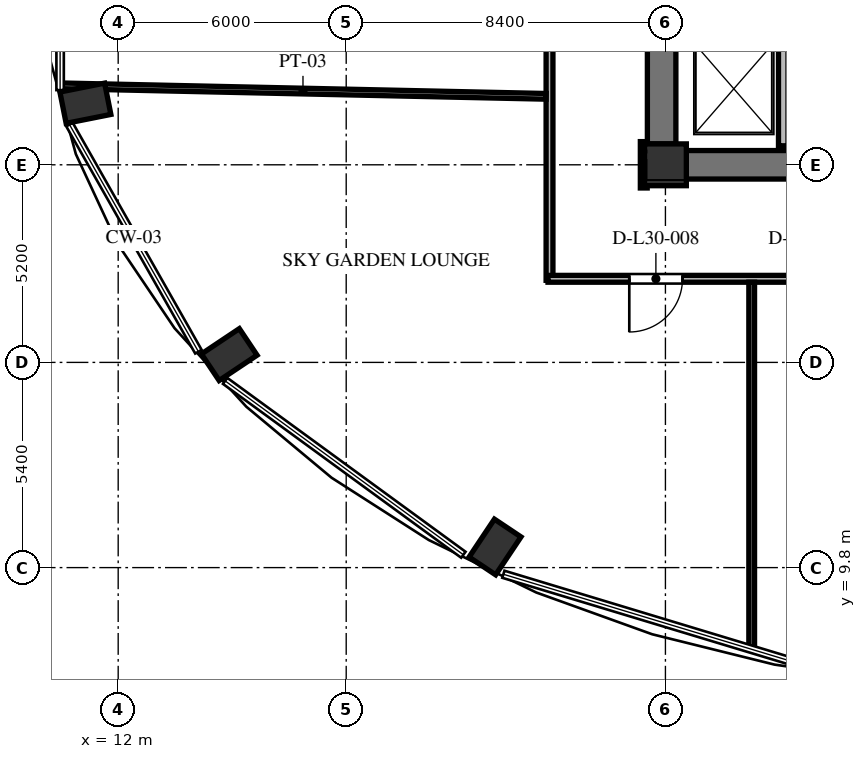
"""IFC4 building model, lengths in metres.
Left out: names, types, materials, properties, quantities, classifications, styles, units other than length and angle.
Written with IfcOpenShell. Run it as: python <this file> out.ifc"""

import sys

from ifc_helpers import new_model, si_unit, direction, frame, frame_2d, origin, origin_2d, place, context, subcontext, project, spatial, rectangle, extrude, element, fill, save


model = new_model("IFC4")
c1 = context("Model", 3, precision=1e-05, world=origin(), true_north=direction((0.0, 1.0)))
c2 = subcontext(c1, "Body", "Model", "MODEL_VIEW")
j1 = project(units=[si_unit("LENGTHUNIT", "METRE"), si_unit("PLANEANGLEUNIT", "RADIAN")], contexts=[c1])
p1 = place(None, origin())
s1 = spatial("IfcSite", under=j1, at=p1, CompositionType="ELEMENT")
p2 = place(p1, origin())
s2 = spatial("IfcBuilding", under=s1, at=p2, CompositionType="ELEMENT")
p3 = place(p2, frame((0.0, 0.0, 118.224)))
s3 = spatial("IfcBuildingStorey", under=s2, at=p3, CompositionType="ELEMENT", Elevation=118.224)
for number, where, z_axis, x_axis in (
    (1, (11.137, 22.02, 0.0), (0.0, 0.0, 1.0), (-0.981, -0.195, 0.0)),
    (2, (14.922, 15.405, 0.0), (0.0, 0.0, 1.0), (-0.831, -0.556, 0.0)),
    (3, (21.916, 10.343, 0.0), (0.0, 0.0, 1.0), (-0.556, -0.831, 0.0)),
):
    element("IfcColumn", number, at=place(p3, frame(where, z_axis=z_axis, x_axis=x_axis)), inside=s3, PredefinedType="COLUMN", context=c2, shape_type="SweptSolid", body=[
        extrude(rectangle(XDim=1.2, YDim=0.84, at=origin_2d()), origin(), (0.0, 0.0, 1.0), 3.648),
    ])
p4 = place(p3, frame((26.4, 20.4, 0.0), z_axis=(0.0, 0.0, 1.0), x_axis=(1.0, 0.0, 0.0)))
e4 = element("IfcColumn", 4, at=p4, inside=s3, PredefinedType="COLUMN", context=c2, shape_type="SweptSolid", body=[
    extrude(rectangle(XDim=1.1, YDim=1.1, at=origin_2d()), origin(), (0.0, 0.0, 1.0), 3.648),
])
p5 = place(p3, frame((26.3, 20.95, 0.0), z_axis=(0.0, 0.0, 1.0), x_axis=(0.0, 1.0, 0.0)))
e5 = element("IfcWall", 5, at=p5, inside=s3, PredefinedType="SHEAR", context=c2, shape_type="SweptSolid", body=[
    extrude(rectangle(XDim=14.1, YDim=0.75, at=frame_2d((7.05, 0.0))), origin(), (0.0, 0.0, 1.0), 3.648),
])
p6 = place(p5, frame((6.5, 0.0, 0.0)))
e6 = element("IfcOpeningElement", 6, at=p6, cuts=e5, PredefinedType="OPENING", context=c2, shape_type="SweptSolid", body=[
    extrude(rectangle(XDim=1.2, YDim=2.15, at=frame_2d((0.6, 1.075))), frame((0.0, 0.385, 0.0), z_axis=(0.0, -1.0, 0.0), x_axis=(1.0, 0.0, 0.0)), (0.0, 0.0, 1.0), 0.77),
])
p7 = place(p5, frame((9.6, 0.0, 0.0)))
e7 = element("IfcOpeningElement", 7, at=p7, cuts=e5, PredefinedType="OPENING", context=c2, shape_type="SweptSolid", body=[
    extrude(rectangle(XDim=1.3, YDim=2.2, at=frame_2d((0.65, 1.1))), frame((0.0, 0.385, 0.0), z_axis=(0.0, -1.0, 0.0), x_axis=(1.0, 0.0, 0.0)), (0.0, 0.0, 1.0), 0.77),
])
p8 = place(p5, frame((3.26, 0.0, 0.0)))
e8 = element("IfcOpeningElement", 8, at=p8, cuts=e5, PredefinedType="OPENING", context=c2, shape_type="SweptSolid", body=[
    extrude(rectangle(XDim=1.3, YDim=2.2, at=frame_2d((0.65, 1.1))), frame((0.0, 0.385, 0.0), z_axis=(0.0, -1.0, 0.0), x_axis=(1.0, 0.0, 0.0)), (0.0, 0.0, 1.0), 0.77),
])
p9 = place(p3, frame((26.95, 20.4, 0.0), z_axis=(0.0, 0.0, 1.0), x_axis=(1.0, 0.0, 0.0)))
e9 = element("IfcWall", 9, at=p9, inside=s3, PredefinedType="SHEAR", context=c2, shape_type="SweptSolid", body=[
    extrude(rectangle(XDim=5.375, YDim=0.75, at=frame_2d((2.688, 0.0))), origin(), (0.0, 0.0, 1.0), 3.648),
])
p10 = place(p3, frame((29.5, 20.9, 0.0), z_axis=(0.0, 0.0, 1.0), x_axis=(0.0, 1.0, 0.0)))
e10 = element("IfcWall", 10, at=p10, inside=s3, PredefinedType="SOLIDWALL", context=c2, shape_type="SweptSolid", body=[
    extrude(rectangle(XDim=2.8, YDim=0.25, at=frame_2d((1.4, 0.0))), origin(), (0.0, 0.0, 1.0), 3.428),
])
p11 = place(p3, frame((23.35, 17.36, 0.0), z_axis=(0.0, 0.0, 1.0), x_axis=(0.0, 1.0, 0.0)))
e11 = element("IfcWall", 11, at=p11, inside=s3, PredefinedType="PARTITIONING", context=c2, shape_type="SweptSolid", body=[
    extrude(rectangle(XDim=18.505, YDim=0.18, at=frame_2d((9.252, 0.0))), origin(), (0.0, 0.0, 1.0), 3.428),
])
p12 = place(p11, frame((10.814, 0.0, 0.0)))
e12 = element("IfcOpeningElement", 12, at=p12, cuts=e11, PredefinedType="OPENING", context=c2, shape_type="SweptSolid", body=[
    extrude(rectangle(XDim=1.4, YDim=2.2, at=frame_2d((0.7, 1.1))), frame((0.0, 0.1, 0.0), z_axis=(0.0, -1.0, 0.0), x_axis=(1.0, 0.0, 0.0)), (0.0, 0.0, 1.0), 0.2),
])
p13 = place(p3, frame((25.83, 21.01, 0.0), z_axis=(0.0, 0.0, 1.0), x_axis=(0.0, -1.0, 0.0)))
e13 = element("IfcWall", 13, at=p13, inside=s3, PredefinedType="PARTITIONING", context=c2, shape_type="SweptSolid", body=[
    extrude(rectangle(XDim=1.22, YDim=0.18, at=frame_2d((0.61, 0.0))), origin(), (0.0, 0.0, 1.0), 3.428),
])
p14 = place(p3, frame((45.24, 17.4, 0.0), z_axis=(0.0, 0.0, 1.0), x_axis=(-1.0, 0.0, 0.0)))
e14 = element("IfcWall", 14, at=p14, inside=s3, PredefinedType="PARTITIONING", context=c2, shape_type="SweptSolid", body=[
    extrude(rectangle(XDim=21.93, YDim=0.18, at=frame_2d((10.965, 0.0))), origin(), (0.0, 0.0, 1.0), 3.053),
])
p15 = place(p14, frame((18.391, 0.0, 0.0)))
e15 = element("IfcOpeningElement", 15, at=p15, cuts=e14, PredefinedType="OPENING", context=c2, shape_type="SweptSolid", body=[
    extrude(rectangle(XDim=1.4, YDim=2.2, at=frame_2d((0.7, 1.1))), frame((0.0, 0.1, 0.0), z_axis=(0.0, -1.0, 0.0), x_axis=(1.0, 0.0, 0.0)), (0.0, 0.0, 1.0), 0.2),
])
p16 = place(p14, frame((14.465, 0.0, 0.0)))
e16 = element("IfcOpeningElement", 16, at=p16, cuts=e14, PredefinedType="OPENING", context=c2, shape_type="SweptSolid", body=[
    extrude(rectangle(XDim=1.05, YDim=2.15, at=frame_2d((0.525, 1.075))), frame((0.0, 0.1, 0.0), z_axis=(0.0, -1.0, 0.0), x_axis=(1.0, 0.0, 0.0)), (0.0, 0.0, 1.0), 0.2),
])
p17 = place(p14, frame((9.515, 0.0, 0.0)))
e17 = element("IfcOpeningElement", 17, at=p17, cuts=e14, PredefinedType="OPENING", context=c2, shape_type="SweptSolid", body=[
    extrude(rectangle(XDim=1.05, YDim=2.15, at=frame_2d((0.525, 1.075))), frame((0.0, 0.1, 0.0), z_axis=(0.0, -1.0, 0.0), x_axis=(1.0, 0.0, 0.0)), (0.0, 0.0, 1.0), 0.2),
])
p18 = place(p14, frame((4.961, 0.0, 0.0)))
e18 = element("IfcOpeningElement", 18, at=p18, cuts=e14, PredefinedType="OPENING", context=c2, shape_type="SweptSolid", body=[
    extrude(rectangle(XDim=1.05, YDim=2.15, at=frame_2d((0.525, 1.075))), frame((0.0, 0.1, 0.0), z_axis=(0.0, -1.0, 0.0), x_axis=(1.0, 0.0, 0.0)), (0.0, 0.0, 1.0), 0.2),
])
p19 = place(p14, frame((1.41, 0.0, 0.0)))
e19 = element("IfcOpeningElement", 19, at=p19, cuts=e14, PredefinedType="OPENING", context=c2, shape_type="SweptSolid", body=[
    extrude(rectangle(XDim=1.4, YDim=2.2, at=frame_2d((0.7, 1.1))), frame((0.0, 0.1, 0.0), z_axis=(0.0, -1.0, 0.0), x_axis=(1.0, 0.0, 0.0)), (0.0, 0.0, 1.0), 0.2),
])
p20 = place(p3, frame((10.465, 22.479, 0.0), z_axis=(0.0, 0.0, 1.0), x_axis=(0.999765147572, -0.021671402821, 0.0)))
e20 = element("IfcWall", 20, at=p20, inside=s3, PredefinedType="PARTITIONING", context=c2, shape_type="SweptSolid", body=[
    extrude(rectangle(XDim=12.798, YDim=0.15, at=frame_2d((6.399, 0.0))), origin(), (0.0, 0.0, 1.0), 3.428),
])
p21 = place(p3, frame((28.67, 7.664, 0.0), z_axis=(0.0, 0.0, 1.0), x_axis=(0.0, 1.0, 0.0)))
e21 = element("IfcWall", 21, at=p21, inside=s3, PredefinedType="PARTITIONING", context=c2, shape_type="SweptSolid", body=[
    extrude(rectangle(XDim=9.646, YDim=0.15, at=frame_2d((4.823, 0.0))), origin(), (0.0, 0.0, 1.0), 3.428),
])
p22 = place(p15, origin())
e22 = element("IfcDoor", 22, at=p22, inside=s3, OperationType="SINGLE_SWING_RIGHT", PredefinedType="DOOR", context=c2, shape_type="SweptSolid", body=[
    extrude(rectangle(XDim=1.4, YDim=2.2, at=frame_2d((0.7, 1.1))), frame((0.0, 0.025, 0.0), z_axis=(0.0, -1.0, 0.0), x_axis=(1.0, 0.0, 0.0)), (0.0, 0.0, 1.0), 0.05),
])
fill(e15, e22)
save(model, sys.argv[1])
